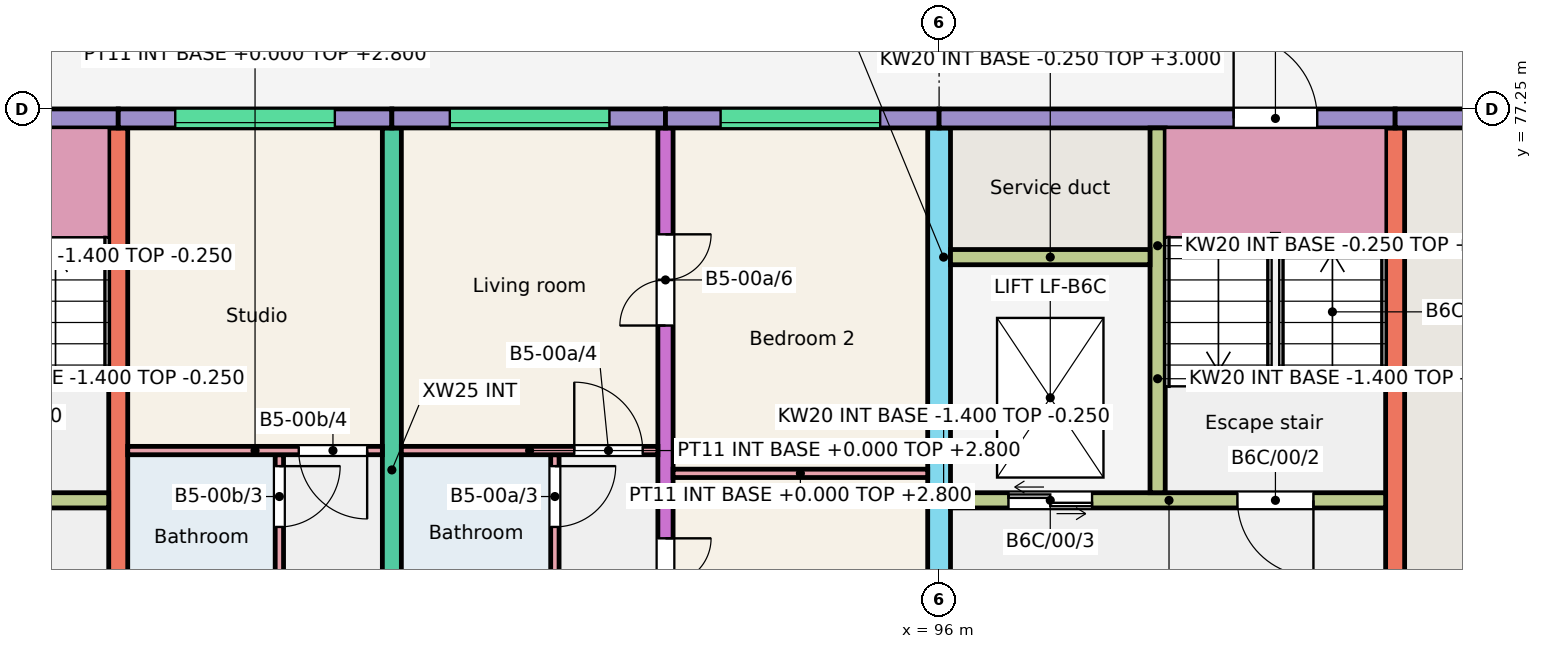
"""IFC4 building model, lengths in metres.
Left out: names, types, materials, properties, quantities, classifications, styles, units other than length and angle.
Written with IfcOpenShell. Run it as: python <this file> out.ifc"""

import sys

from ifc_helpers import new_model, si_unit, direction, frame, frame_2d, origin, place, context, subcontext, project, spatial, rectangle, extrude, element, fill, save


model = new_model("IFC4")
c1 = context("Model", 3, precision=1e-05, world=origin(), true_north=direction((0.0, 1.0)))
c2 = subcontext(c1, "Body", "Model", "MODEL_VIEW")
j1 = project(units=[si_unit("LENGTHUNIT", "METRE"), si_unit("PLANEANGLEUNIT", "RADIAN")], contexts=[c1])
p1 = place(None, origin())
s1 = spatial("IfcSite", under=j1, at=p1, CompositionType="ELEMENT")
p2 = place(p1, origin())
s2 = spatial("IfcBuilding", under=s1, at=p2, CompositionType="ELEMENT")
p3 = place(p2, origin())
s3 = spatial("IfcBuildingStorey", under=s2, at=p3, CompositionType="ELEMENT", Elevation=0.0)
for number, where, z_axis, x_axis in (
    (1, (85.2, 68.0, -0.25), (0.0, 0.0, 1.0), (0.0, 1.0, 0.0)),
    (2, (88.8, 68.0, -0.25), (0.0, 0.0, 1.0), (0.0, 1.0, 0.0)),
):
    element("IfcWall", number, at=place(p3, frame(where, z_axis=z_axis, x_axis=x_axis)), inside=s3, PredefinedType="SHEAR", context=c2, shape_type="SweptSolid", body=[
        extrude(rectangle(XDim=9.0, YDim=0.25, at=frame_2d((4.5, 0.0))), origin(), (0.0, 0.0, 1.0), 3.25),
    ])
p4 = place(p3, frame((92.4, 68.0, -0.25), z_axis=(0.0, 0.0, 1.0), x_axis=(0.0, 1.0, 0.0)))
e3 = element("IfcWall", 3, at=p4, inside=s3, PredefinedType="SHEAR", context=c2, shape_type="SweptSolid", body=[
    extrude(rectangle(XDim=9.0, YDim=0.2, at=frame_2d((4.5, 0.0))), origin(), (0.0, 0.0, 1.0), 3.25),
])
p5 = place(p4, frame((2.4, 0.0, 0.25)))
e4 = element("IfcOpeningElement", 4, at=p5, cuts=e3, PredefinedType="OPENING", context=c2, shape_type="SweptSolid", body=[
    extrude(rectangle(XDim=1.2, YDim=2.1, at=frame_2d((0.6, 1.05))), frame((0.0, 0.11, 0.0), z_axis=(0.0, -1.0, 0.0), x_axis=(1.0, 0.0, 0.0)), (0.0, 0.0, 1.0), 0.22),
])
p6 = place(p4, frame((6.4, 0.0, 0.25)))
e5 = element("IfcOpeningElement", 5, at=p6, cuts=e3, PredefinedType="OPENING", context=c2, shape_type="SweptSolid", body=[
    extrude(rectangle(XDim=1.2, YDim=2.1, at=frame_2d((0.6, 1.05))), frame((0.0, 0.11, 0.0), z_axis=(0.0, -1.0, 0.0), x_axis=(1.0, 0.0, 0.0)), (0.0, 0.0, 1.0), 0.22),
])
p7 = place(p3, frame((96.0, 66.0, -0.25), z_axis=(0.0, 0.0, 1.0), x_axis=(0.0, 1.0, 0.0)))
e6 = element("IfcWall", 6, at=p7, inside=s3, PredefinedType="SHEAR", context=c2, shape_type="SweptSolid", body=[
    extrude(rectangle(XDim=11.0, YDim=0.3, at=frame_2d((5.5, 0.0))), origin(), (0.0, 0.0, 1.0), 3.25),
])
p8 = place(p7, frame((0.3, 0.0, 0.25)))
e7 = element("IfcOpeningElement", 7, at=p8, cuts=e6, PredefinedType="OPENING", context=c2, shape_type="SweptSolid", body=[
    extrude(rectangle(XDim=1.2, YDim=2.1, at=frame_2d((0.6, 1.05))), frame((0.0, 0.16, 0.0), z_axis=(0.0, -1.0, 0.0), x_axis=(1.0, 0.0, 0.0)), (0.0, 0.0, 1.0), 0.32),
])
p9 = place(p3, frame((102.0, 68.0, -0.25), z_axis=(0.0, 0.0, 1.0), x_axis=(0.0, 1.0, 0.0)))
e8 = element("IfcWall", 8, at=p9, inside=s3, PredefinedType="SHEAR", context=c2, shape_type="SweptSolid", body=[
    extrude(rectangle(XDim=9.0, YDim=0.25, at=frame_2d((4.5, 0.0))), origin(), (0.0, 0.0, 1.0), 3.25),
])
p10 = place(p3, frame((79.2, 77.125, -0.25), z_axis=(0.0, 0.0, 1.0), x_axis=(1.0, 0.0, 0.0)))
e9 = element("IfcWall", 9, at=p10, inside=s3, PredefinedType="SOLIDWALL", context=c2, shape_type="SweptSolid", body=[
    extrude(rectangle(XDim=6.0, YDim=0.25, at=frame_2d((3.0, 0.0))), origin(), (0.0, 0.0, 1.0), 3.25),
])
p11 = place(p10, frame((3.875, 0.0, 0.25)))
e10 = element("IfcOpeningElement", 10, at=p11, cuts=e9, PredefinedType="OPENING", context=c2, shape_type="SweptSolid", body=[
    extrude(rectangle(XDim=1.1, YDim=2.1, at=frame_2d((0.55, 1.05))), frame((0.0, 0.135, 0.0), z_axis=(0.0, -1.0, 0.0), x_axis=(1.0, 0.0, 0.0)), (0.0, 0.0, 1.0), 0.27),
])
p12 = place(p3, frame((79.35, 72.1, -0.25), z_axis=(0.0, 0.0, 1.0), x_axis=(1.0, 0.0, 0.0)))
e11 = element("IfcWall", 11, at=p12, inside=s3, PredefinedType="SHEAR", context=c2, shape_type="SweptSolid", body=[
    extrude(rectangle(XDim=5.725, YDim=0.2, at=frame_2d((2.862, 0.0))), origin(), (0.0, 0.0, 1.0), 3.25),
])
p13 = place(p12, frame((3.775, 0.0, 0.25)))
e12 = element("IfcOpeningElement", 12, at=p13, cuts=e11, PredefinedType="OPENING", context=c2, shape_type="SweptSolid", body=[
    extrude(rectangle(XDim=1.0, YDim=2.1, at=frame_2d((0.5, 1.05))), frame((0.0, 0.11, 0.0), z_axis=(0.0, -1.0, 0.0), x_axis=(1.0, 0.0, 0.0)), (0.0, 0.0, 1.0), 0.22),
])
p14 = place(p12, frame((0.762, 0.0, 0.25)))
e13 = element("IfcOpeningElement", 13, at=p14, cuts=e11, PredefinedType="OPENING", context=c2, shape_type="SweptSolid", body=[
    extrude(rectangle(XDim=1.1, YDim=2.1, at=frame_2d((0.55, 1.05))), frame((0.0, 0.11, 0.0), z_axis=(0.0, -1.0, 0.0), x_axis=(1.0, 0.0, 0.0)), (0.0, 0.0, 1.0), 0.22),
])
p15 = place(p3, frame((85.2, 77.125, -0.25), z_axis=(0.0, 0.0, 1.0), x_axis=(1.0, 0.0, 0.0)))
e14 = element("IfcWall", 14, at=p15, inside=s3, PredefinedType="SOLIDWALL", context=c2, shape_type="SweptSolid", body=[
    extrude(rectangle(XDim=3.6, YDim=0.25, at=frame_2d((1.8, 0.0))), origin(), (0.0, 0.0, 1.0), 3.25),
])
p16 = place(p15, frame((0.75, 0.0, 1.45)))
e15 = element("IfcOpeningElement", 15, at=p16, cuts=e14, PredefinedType="OPENING", context=c2, shape_type="SweptSolid", body=[
    extrude(rectangle(XDim=2.1, YDim=1.2, at=frame_2d((1.05, 0.6))), frame((0.0, 0.135, 0.0), z_axis=(0.0, -1.0, 0.0), x_axis=(1.0, 0.0, 0.0)), (0.0, 0.0, 1.0), 0.27),
])
p17 = place(p3, frame((88.8, 77.125, -0.25), z_axis=(0.0, 0.0, 1.0), x_axis=(1.0, 0.0, 0.0)))
e16 = element("IfcWall", 16, at=p17, inside=s3, PredefinedType="SOLIDWALL", context=c2, shape_type="SweptSolid", body=[
    extrude(rectangle(XDim=3.6, YDim=0.25, at=frame_2d((1.8, 0.0))), origin(), (0.0, 0.0, 1.0), 3.25),
])
p18 = place(p17, frame((0.762, 0.0, 1.45)))
e17 = element("IfcOpeningElement", 17, at=p18, cuts=e16, PredefinedType="OPENING", context=c2, shape_type="SweptSolid", body=[
    extrude(rectangle(XDim=2.1, YDim=1.2, at=frame_2d((1.05, 0.6))), frame((0.0, 0.135, 0.0), z_axis=(0.0, -1.0, 0.0), x_axis=(1.0, 0.0, 0.0)), (0.0, 0.0, 1.0), 0.27),
])
p19 = place(p3, frame((92.4, 77.125, -0.25), z_axis=(0.0, 0.0, 1.0), x_axis=(1.0, 0.0, 0.0)))
e18 = element("IfcWall", 18, at=p19, inside=s3, PredefinedType="SOLIDWALL", context=c2, shape_type="SweptSolid", body=[
    extrude(rectangle(XDim=3.6, YDim=0.25, at=frame_2d((1.8, 0.0))), origin(), (0.0, 0.0, 1.0), 3.25),
])
p20 = place(p19, frame((0.725, 0.0, 1.45)))
e19 = element("IfcOpeningElement", 19, at=p20, cuts=e18, PredefinedType="OPENING", context=c2, shape_type="SweptSolid", body=[
    extrude(rectangle(XDim=2.1, YDim=1.2, at=frame_2d((1.05, 0.6))), frame((0.0, 0.135, 0.0), z_axis=(0.0, -1.0, 0.0), x_axis=(1.0, 0.0, 0.0)), (0.0, 0.0, 1.0), 0.27),
])
p21 = place(p3, frame((96.0, 77.125, -0.25), z_axis=(0.0, 0.0, 1.0), x_axis=(1.0, 0.0, 0.0)))
e20 = element("IfcWall", 20, at=p21, inside=s3, PredefinedType="SOLIDWALL", context=c2, shape_type="SweptSolid", body=[
    extrude(rectangle(XDim=6.0, YDim=0.25, at=frame_2d((3.0, 0.0))), origin(), (0.0, 0.0, 1.0), 3.25),
])
p22 = place(p21, frame((3.875, 0.0, 0.25)))
e21 = element("IfcOpeningElement", 21, at=p22, cuts=e20, PredefinedType="OPENING", context=c2, shape_type="SweptSolid", body=[
    extrude(rectangle(XDim=1.1, YDim=2.1, at=frame_2d((0.55, 1.05))), frame((0.0, 0.135, 0.0), z_axis=(0.0, -1.0, 0.0), x_axis=(1.0, 0.0, 0.0)), (0.0, 0.0, 1.0), 0.27),
])
p23 = place(p3, frame((96.15, 72.1, -0.25), z_axis=(0.0, 0.0, 1.0), x_axis=(1.0, 0.0, 0.0)))
e22 = element("IfcWall", 22, at=p23, inside=s3, PredefinedType="SHEAR", context=c2, shape_type="SweptSolid", body=[
    extrude(rectangle(XDim=5.725, YDim=0.2, at=frame_2d((2.863, 0.0))), origin(), (0.0, 0.0, 1.0), 3.25),
])
p24 = place(p23, frame((3.775, 0.0, 0.25)))
e23 = element("IfcOpeningElement", 23, at=p24, cuts=e22, PredefinedType="OPENING", context=c2, shape_type="SweptSolid", body=[
    extrude(rectangle(XDim=1.0, YDim=2.1, at=frame_2d((0.5, 1.05))), frame((0.0, 0.11, 0.0), z_axis=(0.0, -1.0, 0.0), x_axis=(1.0, 0.0, 0.0)), (0.0, 0.0, 1.0), 0.22),
])
p25 = place(p23, frame((0.762, 0.0, 0.25)))
e24 = element("IfcOpeningElement", 24, at=p25, cuts=e22, PredefinedType="OPENING", context=c2, shape_type="SweptSolid", body=[
    extrude(rectangle(XDim=1.1, YDim=2.1, at=frame_2d((0.55, 1.05))), frame((0.0, 0.11, 0.0), z_axis=(0.0, -1.0, 0.0), x_axis=(1.0, 0.0, 0.0)), (0.0, 0.0, 1.0), 0.22),
])
p26 = place(p3, frame((98.875, 72.2, -0.25), z_axis=(0.0, 0.0, 1.0), x_axis=(0.0, 1.0, 0.0)))
e25 = element("IfcWall", 25, at=p26, inside=s3, PredefinedType="SHEAR", context=c2, shape_type="SweptSolid", body=[
    extrude(rectangle(XDim=4.8, YDim=0.2, at=frame_2d((2.4, 0.0))), origin(), (0.0, 0.0, 1.0), 3.25),
])
p27 = place(p3, frame((96.15, 75.3, -0.25), z_axis=(0.0, 0.0, 1.0), x_axis=(1.0, 0.0, 0.0)))
e26 = element("IfcWall", 26, at=p27, inside=s3, PredefinedType="SHEAR", context=c2, shape_type="SweptSolid", body=[
    extrude(rectangle(XDim=2.625, YDim=0.2, at=frame_2d((1.312, 0.0))), origin(), (0.0, 0.0, 1.0), 3.25),
])
p28 = place(p3, frame((102.0, 77.125, -0.25), z_axis=(0.0, 0.0, 1.0), x_axis=(1.0, 0.0, 0.0)))
e27 = element("IfcWall", 27, at=p28, inside=s3, PredefinedType="SOLIDWALL", context=c2, shape_type="SweptSolid", body=[
    extrude(rectangle(XDim=3.6, YDim=0.25, at=frame_2d((1.8, 0.0))), origin(), (0.0, 0.0, 1.0), 3.25),
])
p29 = place(p28, frame((1.312, 0.0, 0.25)))
e28 = element("IfcOpeningElement", 28, at=p29, cuts=e27, PredefinedType="OPENING", context=c2, shape_type="SweptSolid", body=[
    extrude(rectangle(XDim=1.0, YDim=2.1, at=frame_2d((0.5, 1.05))), frame((0.0, 0.135, 0.0), z_axis=(0.0, -1.0, 0.0), x_axis=(1.0, 0.0, 0.0)), (0.0, 0.0, 1.0), 0.27),
])
for number, where, z_axis, x_axis in (
    (29, (96.0, 72.1, -1.4), (0.0, 0.0, 1.0), (1.0, 0.0, 0.0)),
    (30, (96.0, 75.3, -1.4), (0.0, 0.0, 1.0), (1.0, 0.0, 0.0)),
):
    element("IfcWall", number, at=place(p3, frame(where, z_axis=z_axis, x_axis=x_axis)), inside=s3, PredefinedType="SHEAR", context=c2, shape_type="SweptSolid", body=[
        extrude(rectangle(XDim=2.975, YDim=0.2, at=frame_2d((1.488, 0.0))), origin(), (0.0, 0.0, 1.0), 1.15),
    ])
p30 = place(p3, frame((98.875, 72.2, -1.4), z_axis=(0.0, 0.0, 1.0), x_axis=(0.0, 1.0, 0.0)))
e31 = element("IfcWall", 31, at=p30, inside=s3, PredefinedType="SHEAR", context=c2, shape_type="SweptSolid", body=[
    extrude(rectangle(XDim=3.0, YDim=0.2, at=frame_2d((1.5, 0.0))), origin(), (0.0, 0.0, 1.0), 1.15),
])
p31 = place(p3, frame((96.075, 72.2, -1.4), z_axis=(0.0, 0.0, 1.0), x_axis=(0.0, 1.0, 0.0)))
e32 = element("IfcWall", 32, at=p31, inside=s3, PredefinedType="SHEAR", context=c2, shape_type="SweptSolid", body=[
    extrude(rectangle(XDim=3.0, YDim=0.15, at=frame_2d((1.5, 0.0))), origin(), (0.0, 0.0, 1.0), 1.15),
])
p32 = place(p3, frame((90.945, 68.0, 0.0), z_axis=(0.0, 0.0, 1.0), x_axis=(0.0, 1.0, 0.0)))
e33 = element("IfcWall", 33, at=p32, inside=s3, PredefinedType="PARTITIONING", context=c2, shape_type="SweptSolid", body=[
    extrude(rectangle(XDim=4.7, YDim=0.11, at=frame_2d((2.35, 0.0))), origin(), (0.0, 0.0, 1.0), 2.8),
])
p33 = place(p32, frame((0.2, 0.0, 0.0)))
e34 = element("IfcOpeningElement", 34, at=p33, cuts=e33, PredefinedType="OPENING", context=c2, shape_type="SweptSolid", body=[
    extrude(rectangle(XDim=0.8, YDim=2.1, at=frame_2d((0.4, 1.05))), frame((0.0, 0.065, 0.0), z_axis=(0.0, -1.0, 0.0), x_axis=(1.0, 0.0, 0.0)), (0.0, 0.0, 1.0), 0.13),
])
p34 = place(p32, frame((3.75, 0.0, 0.0)))
e35 = element("IfcOpeningElement", 35, at=p34, cuts=e33, PredefinedType="OPENING", context=c2, shape_type="SweptSolid", body=[
    extrude(rectangle(XDim=0.8, YDim=2.1, at=frame_2d((0.4, 1.05))), frame((0.0, 0.065, 0.0), z_axis=(0.0, -1.0, 0.0), x_axis=(1.0, 0.0, 0.0)), (0.0, 0.0, 1.0), 0.13),
])
p35 = place(p3, frame((88.925, 72.755, 0.0), z_axis=(0.0, 0.0, 1.0), x_axis=(1.0, 0.0, 0.0)))
e36 = element("IfcWall", 36, at=p35, inside=s3, PredefinedType="PARTITIONING", context=c2, shape_type="SweptSolid", body=[
    extrude(rectangle(XDim=3.375, YDim=0.11, at=frame_2d((1.688, 0.0))), origin(), (0.0, 0.0, 1.0), 2.8),
])
p36 = place(p35, frame((2.275, 0.0, 0.0)))
e37 = element("IfcOpeningElement", 37, at=p36, cuts=e36, PredefinedType="OPENING", context=c2, shape_type="SweptSolid", body=[
    extrude(rectangle(XDim=0.9, YDim=2.1, at=frame_2d((0.45, 1.05))), frame((0.0, 0.065, 0.0), z_axis=(0.0, -1.0, 0.0), x_axis=(1.0, 0.0, 0.0)), (0.0, 0.0, 1.0), 0.13),
])
p37 = place(p3, frame((92.5, 72.455, 0.0), z_axis=(0.0, 0.0, 1.0), x_axis=(1.0, 0.0, 0.0)))
e38 = element("IfcWall", 38, at=p37, inside=s3, PredefinedType="PARTITIONING", context=c2, shape_type="SweptSolid", body=[
    extrude(rectangle(XDim=3.35, YDim=0.11, at=frame_2d((1.675, 0.0))), origin(), (0.0, 0.0, 1.0), 2.8),
])
p38 = place(p3, frame((87.32, 68.0, 0.0), z_axis=(0.0, 0.0, 1.0), x_axis=(0.0, 1.0, 0.0)))
e39 = element("IfcWall", 39, at=p38, inside=s3, PredefinedType="PARTITIONING", context=c2, shape_type="SweptSolid", body=[
    extrude(rectangle(XDim=4.7, YDim=0.11, at=frame_2d((2.35, 0.0))), origin(), (0.0, 0.0, 1.0), 2.8),
])
p39 = place(p38, frame((0.2, 0.0, 0.0)))
e40 = element("IfcOpeningElement", 40, at=p39, cuts=e39, PredefinedType="OPENING", context=c2, shape_type="SweptSolid", body=[
    extrude(rectangle(XDim=0.8, YDim=2.1, at=frame_2d((0.4, 1.05))), frame((0.0, 0.065, 0.0), z_axis=(0.0, -1.0, 0.0), x_axis=(1.0, 0.0, 0.0)), (0.0, 0.0, 1.0), 0.13),
])
p40 = place(p38, frame((3.75, 0.0, 0.0)))
e41 = element("IfcOpeningElement", 41, at=p40, cuts=e39, PredefinedType="OPENING", context=c2, shape_type="SweptSolid", body=[
    extrude(rectangle(XDim=0.8, YDim=2.1, at=frame_2d((0.4, 1.05))), frame((0.0, 0.065, 0.0), z_axis=(0.0, -1.0, 0.0), x_axis=(1.0, 0.0, 0.0)), (0.0, 0.0, 1.0), 0.13),
])
p41 = place(p3, frame((85.325, 72.755, 0.0), z_axis=(0.0, 0.0, 1.0), x_axis=(1.0, 0.0, 0.0)))
e42 = element("IfcWall", 42, at=p41, inside=s3, PredefinedType="PARTITIONING", context=c2, shape_type="SweptSolid", body=[
    extrude(rectangle(XDim=3.35, YDim=0.11, at=frame_2d((1.675, 0.0))), origin(), (0.0, 0.0, 1.0), 2.8),
])
p42 = place(p41, frame((2.25, 0.0, 0.0)))
e43 = element("IfcOpeningElement", 43, at=p42, cuts=e42, PredefinedType="OPENING", context=c2, shape_type="SweptSolid", body=[
    extrude(rectangle(XDim=0.9, YDim=2.1, at=frame_2d((0.45, 1.05))), frame((0.0, 0.065, 0.0), z_axis=(0.0, -1.0, 0.0), x_axis=(1.0, 0.0, 0.0)), (0.0, 0.0, 1.0), 0.13),
])
p43 = place(p20, origin())
e44 = element("IfcWindow", 44, at=p43, inside=s3, PartitioningType="SINGLE_PANEL", PredefinedType="WINDOW", context=c2, shape_type="SweptSolid", body=[
    extrude(rectangle(XDim=2.1, YDim=1.2, at=frame_2d((1.05, 0.6))), frame((0.0, -0.025, 0.0), z_axis=(0.0, -1.0, 0.0), x_axis=(1.0, 0.0, 0.0)), (0.0, 0.0, 1.0), 0.06),
])
fill(e19, e44)
p44 = place(p18, origin())
e45 = element("IfcWindow", 45, at=p44, inside=s3, PartitioningType="SINGLE_PANEL", PredefinedType="WINDOW", context=c2, shape_type="SweptSolid", body=[
    extrude(rectangle(XDim=2.1, YDim=1.2, at=frame_2d((1.05, 0.6))), frame((0.0, -0.025, 0.0), z_axis=(0.0, -1.0, 0.0), x_axis=(1.0, 0.0, 0.0)), (0.0, 0.0, 1.0), 0.06),
])
fill(e17, e45)
p45 = place(p16, origin())
e46 = element("IfcWindow", 46, at=p45, inside=s3, PartitioningType="SINGLE_PANEL", PredefinedType="WINDOW", context=c2, shape_type="SweptSolid", body=[
    extrude(rectangle(XDim=2.1, YDim=1.2, at=frame_2d((1.05, 0.6))), frame((0.0, -0.025, 0.0), z_axis=(0.0, -1.0, 0.0), x_axis=(1.0, 0.0, 0.0)), (0.0, 0.0, 1.0), 0.06),
])
fill(e15, e46)
p46 = place(p34, origin())
e47 = element("IfcDoor", 47, at=p46, inside=s3, OperationType="SINGLE_SWING_RIGHT", PredefinedType="DOOR", context=c2, shape_type="SweptSolid", body=[
    extrude(rectangle(XDim=0.8, YDim=2.1, at=frame_2d((0.4, 1.05))), frame((0.0, 0.025, 0.0), z_axis=(0.0, -1.0, 0.0), x_axis=(1.0, 0.0, 0.0)), (0.0, 0.0, 1.0), 0.05),
])
fill(e35, e47)
p47 = place(p36, origin())
e48 = element("IfcDoor", 48, at=p47, inside=s3, OperationType="SINGLE_SWING_LEFT", PredefinedType="DOOR", context=c2, shape_type="SweptSolid", body=[
    extrude(rectangle(XDim=0.9, YDim=2.1, at=frame_2d((0.45, 1.05))), frame((0.0, 0.025, 0.0), z_axis=(0.0, -1.0, 0.0), x_axis=(1.0, 0.0, 0.0)), (0.0, 0.0, 1.0), 0.05),
])
fill(e37, e48)
p48 = place(p5, origin())
e49 = element("IfcDoor", 49, at=p48, inside=s3, OperationType="DOUBLE_DOOR_SINGLE_SWING", PredefinedType="DOOR", context=c2, shape_type="SweptSolid", body=[
    extrude(rectangle(XDim=1.2, YDim=2.1, at=frame_2d((0.6, 1.05))), frame((0.0, 0.025, 0.0), z_axis=(0.0, -1.0, 0.0), x_axis=(1.0, 0.0, 0.0)), (0.0, 0.0, 1.0), 0.05),
])
fill(e4, e49)
p49 = place(p6, origin())
e50 = element("IfcDoor", 50, at=p49, inside=s3, OperationType="DOUBLE_DOOR_SINGLE_SWING", PredefinedType="DOOR", context=c2, shape_type="SweptSolid", body=[
    extrude(rectangle(XDim=1.2, YDim=2.1, at=frame_2d((0.6, 1.05))), frame((0.0, 0.025, 0.0), z_axis=(0.0, -1.0, 0.0), x_axis=(1.0, 0.0, 0.0)), (0.0, 0.0, 1.0), 0.05),
])
fill(e5, e50)
p50 = place(p40, origin())
e51 = element("IfcDoor", 51, at=p50, inside=s3, OperationType="SINGLE_SWING_RIGHT", PredefinedType="DOOR", context=c2, shape_type="SweptSolid", body=[
    extrude(rectangle(XDim=0.8, YDim=2.1, at=frame_2d((0.4, 1.05))), frame((0.0, 0.025, 0.0), z_axis=(0.0, -1.0, 0.0), x_axis=(1.0, 0.0, 0.0)), (0.0, 0.0, 1.0), 0.05),
])
fill(e41, e51)
p51 = place(p42, origin())
e52 = element("IfcDoor", 52, at=p51, inside=s3, OperationType="SINGLE_SWING_RIGHT", PredefinedType="DOOR", context=c2, shape_type="SweptSolid", body=[
    extrude(rectangle(XDim=0.9, YDim=2.1, at=frame_2d((0.45, 1.05))), frame((0.0, 0.025, 0.0), z_axis=(0.0, -1.0, 0.0), x_axis=(1.0, 0.0, 0.0)), (0.0, 0.0, 1.0), 0.05),
])
fill(e43, e52)
p52 = place(p24, origin())
e53 = element("IfcDoor", 53, at=p52, inside=s3, OperationType="SINGLE_SWING_RIGHT", PredefinedType="DOOR", context=c2, shape_type="SweptSolid", body=[
    extrude(rectangle(XDim=1.0, YDim=2.1, at=frame_2d((0.5, 1.05))), frame((0.0, 0.025, 0.0), z_axis=(0.0, -1.0, 0.0), x_axis=(1.0, 0.0, 0.0)), (0.0, 0.0, 1.0), 0.05),
])
fill(e23, e53)
p53 = place(p25, origin())
e54 = element("IfcDoor", 54, at=p53, inside=s3, OperationType="DOUBLE_DOOR_SLIDING", PredefinedType="DOOR", context=c2, shape_type="SweptSolid", body=[
    extrude(rectangle(XDim=1.1, YDim=2.1, at=frame_2d((0.55, 1.05))), frame((0.0, 0.025, 0.0), z_axis=(0.0, -1.0, 0.0), x_axis=(1.0, 0.0, 0.0)), (0.0, 0.0, 1.0), 0.05),
])
fill(e24, e54)
p54 = place(p22, origin())
e55 = element("IfcDoor", 55, at=p54, inside=s3, OperationType="SINGLE_SWING_LEFT", PredefinedType="DOOR", context=c2, shape_type="SweptSolid", body=[
    extrude(rectangle(XDim=1.1, YDim=2.1, at=frame_2d((0.55, 1.05))), frame((0.0, 0.025, 0.0), z_axis=(0.0, -1.0, 0.0), x_axis=(1.0, 0.0, 0.0)), (0.0, 0.0, 1.0), 0.05),
])
fill(e21, e55)
save(model, sys.argv[1])
